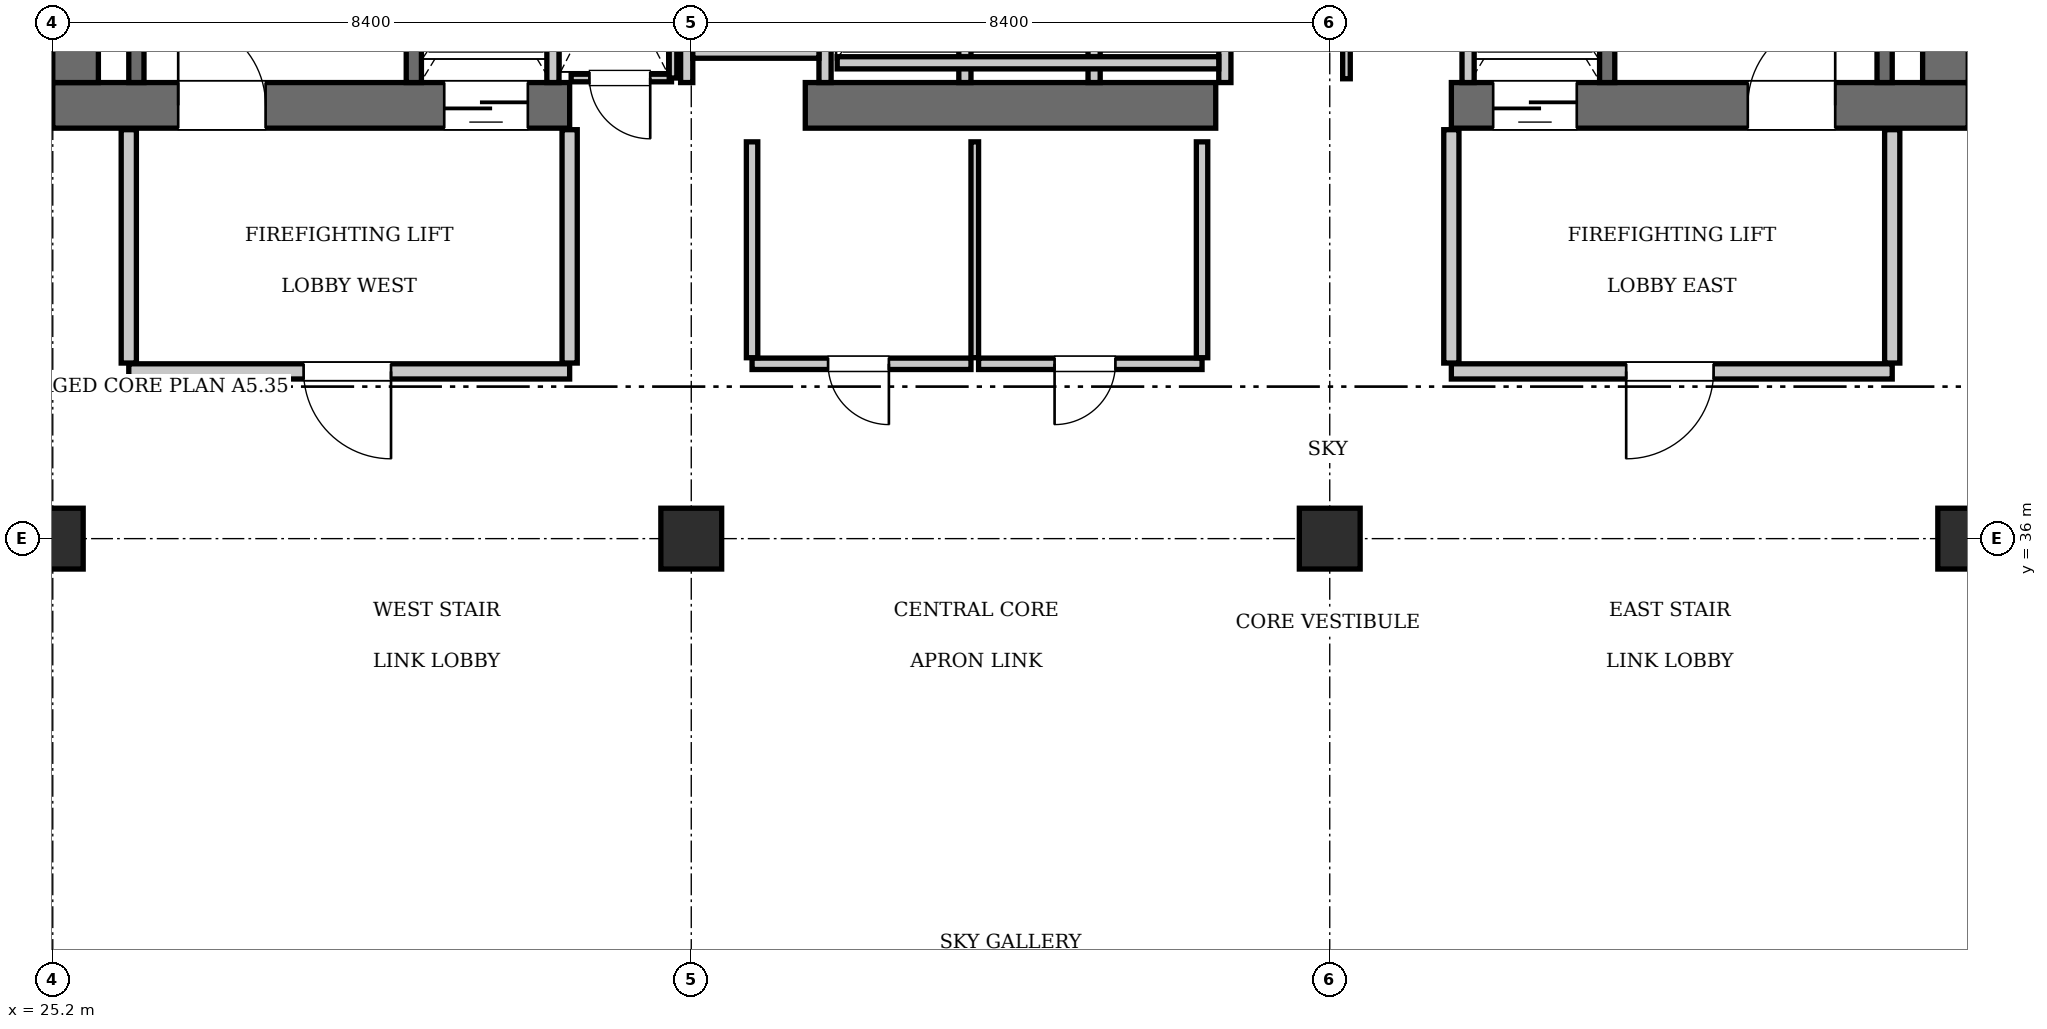
"""IFC4 building model, lengths in metres.
Left out: names, types, materials, properties, quantities, classifications, styles, units other than length and angle.
Written with IfcOpenShell. Run it as: python <this file> out.ifc"""

import sys

from ifc_helpers import new_model, si_unit, direction, frame, frame_2d, origin, origin_2d, place, context, subcontext, project, spatial, rectangle, extrude, element, fill, save


model = new_model("IFC4")
c1 = context("Model", 3, precision=1e-05, world=origin(), true_north=direction((0.0, 1.0)))
c2 = subcontext(c1, "Body", "Model", "MODEL_VIEW")
j1 = project(units=[si_unit("LENGTHUNIT", "METRE"), si_unit("PLANEANGLEUNIT", "RADIAN")], contexts=[c1])
p1 = place(None, origin())
s1 = spatial("IfcSite", under=j1, at=p1, CompositionType="ELEMENT")
p2 = place(p1, origin())
s2 = spatial("IfcBuilding", under=s1, at=p2, CompositionType="ELEMENT")
p3 = place(p2, frame((0.0, 0.0, 337.4)))
s3 = spatial("IfcBuildingStorey", under=s2, at=p3, CompositionType="ELEMENT", Elevation=337.4)
p4 = place(p3, frame((25.2, 41.7, 0.0), z_axis=(0.0, 0.0, 1.0), x_axis=(1.0, 0.0, 0.0)))
e1 = element("IfcWall", 1, at=p4, inside=s3, PredefinedType="SHEAR", context=c2, shape_type="SweptSolid", body=[
    extrude(rectangle(XDim=6.8, YDim=0.6, at=frame_2d((3.4, 0.0))), origin(), (0.0, 0.0, 1.0), 3.85),
])
p5 = place(p4, frame((1.65, 0.0, 0.0)))
e2 = element("IfcOpeningElement", 2, at=p5, cuts=e1, PredefinedType="OPENING", context=c2, shape_type="SweptSolid", body=[
    extrude(rectangle(XDim=1.15, YDim=2.15, at=frame_2d((0.575, 1.075))), frame((0.0, 0.31, 0.0), z_axis=(0.0, -1.0, 0.0), x_axis=(1.0, 0.0, 0.0)), (0.0, 0.0, 1.0), 0.62),
])
p6 = place(p4, frame((5.15, 0.0, 0.0)))
e3 = element("IfcOpeningElement", 3, at=p6, cuts=e1, PredefinedType="OPENING", context=c2, shape_type="SweptSolid", body=[
    extrude(rectangle(XDim=1.1, YDim=2.2, at=frame_2d((0.55, 1.1))), frame((0.0, 0.31, 0.0), z_axis=(0.0, -1.0, 0.0), x_axis=(1.0, 0.0, 0.0)), (0.0, 0.0, 1.0), 0.62),
])
p7 = place(p3, frame((35.1, 41.7, 0.0), z_axis=(0.0, 0.0, 1.0), x_axis=(1.0, 0.0, 0.0)))
e4 = element("IfcWall", 4, at=p7, inside=s3, PredefinedType="SHEAR", context=c2, shape_type="SweptSolid", body=[
    extrude(rectangle(XDim=5.4, YDim=0.6, at=frame_2d((2.7, 0.0))), origin(), (0.0, 0.0, 1.0), 3.85),
])
p8 = place(p3, frame((43.6, 41.7, 0.0), z_axis=(0.0, 0.0, 1.0), x_axis=(1.0, 0.0, 0.0)))
e5 = element("IfcWall", 5, at=p8, inside=s3, PredefinedType="SHEAR", context=c2, shape_type="SweptSolid", body=[
    extrude(rectangle(XDim=6.8, YDim=0.6, at=frame_2d((3.4, 0.0))), origin(), (0.0, 0.0, 1.0), 3.85),
])
p9 = place(p8, frame((3.9, 0.0, 0.0)))
e6 = element("IfcOpeningElement", 6, at=p9, cuts=e5, PredefinedType="OPENING", context=c2, shape_type="SweptSolid", body=[
    extrude(rectangle(XDim=1.15, YDim=2.15, at=frame_2d((0.575, 1.075))), frame((0.0, 0.31, 0.0), z_axis=(0.0, -1.0, 0.0), x_axis=(1.0, 0.0, 0.0)), (0.0, 0.0, 1.0), 0.62),
])
p10 = place(p8, frame((0.55, 0.0, 0.0)))
e7 = element("IfcOpeningElement", 7, at=p10, cuts=e5, PredefinedType="OPENING", context=c2, shape_type="SweptSolid", body=[
    extrude(rectangle(XDim=1.1, YDim=2.2, at=frame_2d((0.55, 1.1))), frame((0.0, 0.31, 0.0), z_axis=(0.0, -1.0, 0.0), x_axis=(1.0, 0.0, 0.0)), (0.0, 0.0, 1.0), 0.62),
])
for number, where, z_axis, x_axis in (
    (8, (25.5, 42.0, 0.0), (0.0, 0.0, 1.0), (0.0, 1.0, 0.0)),
    (9, (50.1, 42.0, 0.0), (0.0, 0.0, 1.0), (0.0, 1.0, 0.0)),
):
    element("IfcWall", number, at=place(p3, frame(where, z_axis=z_axis, x_axis=x_axis)), inside=s3, PredefinedType="SHEAR", context=c2, shape_type="SweptSolid", body=[
        extrude(rectangle(XDim=2.325, YDim=0.6, at=frame_2d((1.163, 0.0))), origin(), (0.0, 0.0, 1.0), 3.85),
    ])
for number, where, z_axis, x_axis in (
    (10, (25.2, 36.0, 0.0), (0.0, 0.0, 1.0), (1.0, 0.0, 0.0)),
    (11, (33.6, 36.0, 0.0), (0.0, 0.0, 1.0), (1.0, 0.0, 0.0)),
    (12, (42.0, 36.0, 0.0), (0.0, 0.0, 1.0), (1.0, 0.0, 0.0)),
    (13, (50.4, 36.0, 0.0), (0.0, 0.0, 1.0), (1.0, 0.0, 0.0)),
):
    element("IfcColumn", number, at=place(p3, frame(where, z_axis=z_axis, x_axis=x_axis)), inside=s3, PredefinedType="COLUMN", context=c2, shape_type="SweptSolid", body=[
        extrude(rectangle(XDim=0.8, YDim=0.8, at=origin_2d()), origin(), (0.0, 0.0, 1.0), 3.85),
    ])
p11 = place(p3, frame((29.95, 42.0, 0.0), z_axis=(0.0, 0.0, 1.0), x_axis=(0.0, 1.0, 0.0)))
e14 = element("IfcWall", 14, at=p11, inside=s3, PredefinedType="SOLIDWALL", context=c2, shape_type="SweptSolid", body=[
    extrude(rectangle(XDim=9.15, YDim=0.2, at=frame_2d((4.575, 0.0))), origin(), (0.0, 0.0, 1.0), 3.61),
])
p12 = place(p3, frame((26.3, 42.0, 0.0), z_axis=(0.0, 0.0, 1.0), x_axis=(0.0, 1.0, 0.0)))
e15 = element("IfcWall", 15, at=p12, inside=s3, PredefinedType="SOLIDWALL", context=c2, shape_type="SweptSolid", body=[
    extrude(rectangle(XDim=9.12, YDim=0.2, at=frame_2d((4.56, 0.0))), origin(), (0.0, 0.0, 1.0), 3.61),
])
p13 = place(p3, frame((45.65, 42.0, 0.0), z_axis=(0.0, 0.0, 1.0), x_axis=(0.0, 1.0, 0.0)))
e16 = element("IfcWall", 16, at=p13, inside=s3, PredefinedType="SOLIDWALL", context=c2, shape_type="SweptSolid", body=[
    extrude(rectangle(XDim=9.15, YDim=0.2, at=frame_2d((4.575, 0.0))), origin(), (0.0, 0.0, 1.0), 3.61),
])
p14 = place(p3, frame((49.3, 42.0, 0.0), z_axis=(0.0, 0.0, 1.0), x_axis=(0.0, 1.0, 0.0)))
e17 = element("IfcWall", 17, at=p14, inside=s3, PredefinedType="SOLIDWALL", context=c2, shape_type="SweptSolid", body=[
    extrude(rectangle(XDim=9.12, YDim=0.2, at=frame_2d((4.56, 0.0))), origin(), (0.0, 0.0, 1.0), 3.61),
])
for number, where, z_axis, x_axis in (
    (18, (31.78, 42.0, 0.0), (0.0, 0.0, 1.0), (0.0, 1.0, 0.0)),
    (19, (43.82, 42.0, 0.0), (0.0, 0.0, 1.0), (0.0, 1.0, 0.0)),
):
    element("IfcWall", number, at=place(p3, frame(where, z_axis=z_axis, x_axis=x_axis)), inside=s3, PredefinedType="SOLIDWALL", context=c2, shape_type="SweptSolid", body=[
        extrude(rectangle(XDim=2.74, YDim=0.16, at=frame_2d((1.37, 0.0))), origin(), (0.0, 0.0, 1.0), 3.61),
    ])
for number, where, z_axis, x_axis in (
    (20, (37.2, 42.0, 0.0), (0.0, 0.0, 1.0), (0.0, 1.0, 0.0)),
    (21, (38.9, 42.0, 0.0), (0.0, 0.0, 1.0), (0.0, 1.0, 0.0)),
    (22, (40.62, 42.0, 0.0), (0.0, 0.0, 1.0), (0.0, 1.0, 0.0)),
):
    element("IfcWall", number, at=place(p3, frame(where, z_axis=z_axis, x_axis=x_axis)), inside=s3, PredefinedType="SOLIDWALL", context=c2, shape_type="SweptSolid", body=[
        extrude(rectangle(XDim=2.35, YDim=0.16, at=frame_2d((1.175, 0.0))), origin(), (0.0, 0.0, 1.0), 3.61),
    ])
p15 = place(p3, frame((35.52, 42.26, 0.0), z_axis=(0.0, 0.0, 1.0), x_axis=(1.0, 0.0, 0.0)))
e23 = element("IfcWall", 23, at=p15, inside=s3, PredefinedType="SOLIDWALL", context=c2, shape_type="SweptSolid", body=[
    extrude(rectangle(XDim=5.02, YDim=0.16, at=frame_2d((2.51, 0.0))), origin(), (0.0, 0.0, 1.0), 3.61),
])
for number, where, z_axis, x_axis in (
    (24, (33.54, 42.0, 0.0), (0.0, 0.0, 1.0), (0.0, 1.0, 0.0)),
    (25, (35.36, 42.0, 0.0), (0.0, 0.0, 1.0), (0.0, 1.0, 0.0)),
):
    element("IfcWall", number, at=place(p3, frame(where, z_axis=z_axis, x_axis=x_axis)), inside=s3, PredefinedType="SOLIDWALL", context=c2, shape_type="SweptSolid", body=[
        extrude(rectangle(XDim=2.4, YDim=0.16, at=frame_2d((1.2, 0.0))), origin(), (0.0, 0.0, 1.0), 3.61),
    ])
p16 = place(p3, frame((33.62, 42.4, 0.0), z_axis=(0.0, 0.0, 1.0), x_axis=(1.0, 0.0, 0.0)))
e26 = element("IfcWall", 26, at=p16, inside=s3, PredefinedType="SOLIDWALL", context=c2, shape_type="SweptSolid", body=[
    extrude(rectangle(XDim=1.66, YDim=0.16, at=frame_2d((0.83, 0.0))), origin(), (0.0, 0.0, 1.0), 3.61),
])
p17 = place(p3, frame((26.2, 38.2, 0.0), z_axis=(0.0, 0.0, 1.0), x_axis=(1.0, 0.0, 0.0)))
e27 = element("IfcWall", 27, at=p17, inside=s3, PredefinedType="PARTITIONING", context=c2, shape_type="SweptSolid", body=[
    extrude(rectangle(XDim=5.8, YDim=0.2, at=frame_2d((2.9, 0.0))), origin(), (0.0, 0.0, 1.0), 3.61),
])
p18 = place(p17, frame((2.3, 0.0, 0.0)))
e28 = element("IfcOpeningElement", 28, at=p18, cuts=e27, PredefinedType="OPENING", context=c2, shape_type="SweptSolid", body=[
    extrude(rectangle(XDim=1.15, YDim=2.15, at=frame_2d((0.575, 1.075))), frame((0.0, 0.11, 0.0), z_axis=(0.0, -1.0, 0.0), x_axis=(1.0, 0.0, 0.0)), (0.0, 0.0, 1.0), 0.22),
])
for number, where, z_axis, x_axis in (
    (29, (26.2, 38.31, 0.0), (0.0, 0.0, 1.0), (0.0, 1.0, 0.0)),
    (30, (32.0, 38.31, 0.0), (0.0, 0.0, 1.0), (0.0, 1.0, 0.0)),
):
    element("IfcWall", number, at=place(p3, frame(where, z_axis=z_axis, x_axis=x_axis)), inside=s3, PredefinedType="PARTITIONING", context=c2, shape_type="SweptSolid", body=[
        extrude(rectangle(XDim=3.07, YDim=0.2, at=frame_2d((1.535, 0.0))), origin(), (0.0, 0.0, 1.0), 3.61),
    ])
p19 = place(p3, frame((43.6, 38.2, 0.0), z_axis=(0.0, 0.0, 1.0), x_axis=(1.0, 0.0, 0.0)))
e31 = element("IfcWall", 31, at=p19, inside=s3, PredefinedType="PARTITIONING", context=c2, shape_type="SweptSolid", body=[
    extrude(rectangle(XDim=5.8, YDim=0.2, at=frame_2d((2.9, 0.0))), origin(), (0.0, 0.0, 1.0), 3.61),
])
p20 = place(p19, frame((2.3, 0.0, 0.0)))
e32 = element("IfcOpeningElement", 32, at=p20, cuts=e31, PredefinedType="OPENING", context=c2, shape_type="SweptSolid", body=[
    extrude(rectangle(XDim=1.15, YDim=2.15, at=frame_2d((0.575, 1.075))), frame((0.0, 0.11, 0.0), z_axis=(0.0, -1.0, 0.0), x_axis=(1.0, 0.0, 0.0)), (0.0, 0.0, 1.0), 0.22),
])
for number, where, z_axis, x_axis in (
    (33, (43.6, 38.31, 0.0), (0.0, 0.0, 1.0), (0.0, 1.0, 0.0)),
    (34, (49.4, 38.31, 0.0), (0.0, 0.0, 1.0), (0.0, 1.0, 0.0)),
):
    element("IfcWall", number, at=place(p3, frame(where, z_axis=z_axis, x_axis=x_axis)), inside=s3, PredefinedType="PARTITIONING", context=c2, shape_type="SweptSolid", body=[
        extrude(rectangle(XDim=3.07, YDim=0.2, at=frame_2d((1.535, 0.0))), origin(), (0.0, 0.0, 1.0), 3.61),
    ])
p21 = place(p3, frame((32.02, 42.06, 0.0), z_axis=(0.0, 0.0, 1.0), x_axis=(1.0, 0.0, 0.0)))
e35 = element("IfcWall", 35, at=p21, inside=s3, PredefinedType="PARTITIONING", context=c2, shape_type="SweptSolid", body=[
    extrude(rectangle(XDim=1.32, YDim=0.1, at=frame_2d((0.66, 0.0))), origin(), (0.0, 0.0, 1.0), 3.61),
])
p22 = place(p21, frame((0.24, 0.0, 0.0)))
e36 = element("IfcOpeningElement", 36, at=p22, cuts=e35, PredefinedType="OPENING", context=c2, shape_type="SweptSolid", body=[
    extrude(rectangle(XDim=0.8, YDim=2.05, at=frame_2d((0.4, 1.025))), frame((0.0, 0.06, 0.0), z_axis=(0.0, -1.0, 0.0), x_axis=(1.0, 0.0, 0.0)), (0.0, 0.0, 1.0), 0.12),
])
p23 = place(p3, frame((33.36, 42.06, 0.0), z_axis=(0.0, 0.0, 1.0), x_axis=(0.0, 1.0, 0.0)))
e37 = element("IfcWall", 37, at=p23, inside=s3, PredefinedType="PARTITIONING", context=c2, shape_type="SweptSolid", body=[
    extrude(rectangle(XDim=2.88, YDim=0.1, at=frame_2d((1.44, 0.0))), origin(), (0.0, 0.0, 1.0), 3.61),
])
p24 = place(p3, frame((42.22, 42.05, 0.0), z_axis=(0.0, 0.0, 1.0), x_axis=(0.0, 1.0, 0.0)))
e38 = element("IfcWall", 38, at=p24, inside=s3, PredefinedType="PARTITIONING", context=c2, shape_type="SweptSolid", body=[
    extrude(rectangle(XDim=2.91, YDim=0.1, at=frame_2d((1.455, 0.0))), origin(), (0.0, 0.0, 1.0), 3.61),
])
p25 = place(p24, frame((0.65, 0.0, 0.0)))
e39 = element("IfcOpeningElement", 39, at=p25, cuts=e38, PredefinedType="OPENING", context=c2, shape_type="SweptSolid", body=[
    extrude(rectangle(XDim=0.8, YDim=2.05, at=frame_2d((0.4, 1.025))), frame((0.0, 0.06, 0.0), z_axis=(0.0, -1.0, 0.0), x_axis=(1.0, 0.0, 0.0)), (0.0, 0.0, 1.0), 0.12),
])
p26 = place(p3, frame((34.4, 38.3, 0.0), z_axis=(0.0, 0.0, 1.0), x_axis=(1.0, 0.0, 0.0)))
e40 = element("IfcWall", 40, at=p26, inside=s3, PredefinedType="PARTITIONING", context=c2, shape_type="SweptSolid", body=[
    extrude(rectangle(XDim=2.88, YDim=0.15, at=frame_2d((1.44, 0.0))), origin(), (0.0, 0.0, 1.0), 3.61),
])
p27 = place(p26, frame((1.0, 0.0, 0.0)))
e41 = element("IfcOpeningElement", 41, at=p27, cuts=e40, PredefinedType="OPENING", context=c2, shape_type="SweptSolid", body=[
    extrude(rectangle(XDim=0.8, YDim=2.05, at=frame_2d((0.4, 1.025))), frame((0.0, 0.085, 0.0), z_axis=(0.0, -1.0, 0.0), x_axis=(1.0, 0.0, 0.0)), (0.0, 0.0, 1.0), 0.17),
])
p28 = place(p3, frame((37.38, 38.3, 0.0), z_axis=(0.0, 0.0, 1.0), x_axis=(1.0, 0.0, 0.0)))
e42 = element("IfcWall", 42, at=p28, inside=s3, PredefinedType="PARTITIONING", context=c2, shape_type="SweptSolid", body=[
    extrude(rectangle(XDim=2.94, YDim=0.15, at=frame_2d((1.47, 0.0))), origin(), (0.0, 0.0, 1.0), 3.61),
])
p29 = place(p28, frame((1.0, 0.0, 0.0)))
e43 = element("IfcOpeningElement", 43, at=p29, cuts=e42, PredefinedType="OPENING", context=c2, shape_type="SweptSolid", body=[
    extrude(rectangle(XDim=0.8, YDim=2.05, at=frame_2d((0.4, 1.025))), frame((0.0, 0.085, 0.0), z_axis=(0.0, -1.0, 0.0), x_axis=(1.0, 0.0, 0.0)), (0.0, 0.0, 1.0), 0.17),
])
p30 = place(p3, frame((34.4, 38.38, 0.0), z_axis=(0.0, 0.0, 1.0), x_axis=(0.0, 1.0, 0.0)))
e44 = element("IfcWall", 44, at=p30, inside=s3, PredefinedType="PARTITIONING", context=c2, shape_type="SweptSolid", body=[
    extrude(rectangle(XDim=2.84, YDim=0.15, at=frame_2d((1.42, 0.0))), origin(), (0.0, 0.0, 1.0), 3.61),
])
p31 = place(p3, frame((37.33, 38.38, 0.0), z_axis=(0.0, 0.0, 1.0), x_axis=(0.0, 1.0, 0.0)))
e45 = element("IfcWall", 45, at=p31, inside=s3, PredefinedType="PARTITIONING", context=c2, shape_type="SweptSolid", body=[
    extrude(rectangle(XDim=2.84, YDim=0.1, at=frame_2d((1.42, 0.0))), origin(), (0.0, 0.0, 1.0), 3.61),
])
p32 = place(p3, frame((40.32, 38.38, 0.0), z_axis=(0.0, 0.0, 1.0), x_axis=(0.0, 1.0, 0.0)))
e46 = element("IfcWall", 46, at=p32, inside=s3, PredefinedType="PARTITIONING", context=c2, shape_type="SweptSolid", body=[
    extrude(rectangle(XDim=2.84, YDim=0.15, at=frame_2d((1.42, 0.0))), origin(), (0.0, 0.0, 1.0), 3.61),
])
p33 = place(p5, origin())
e47 = element("IfcDoor", 47, at=p33, inside=s3, OperationType="SINGLE_SWING_LEFT", PredefinedType="DOOR", context=c2, shape_type="SweptSolid", body=[
    extrude(rectangle(XDim=1.15, YDim=2.15, at=frame_2d((0.575, 1.075))), frame((0.0, 0.025, 0.0), z_axis=(0.0, -1.0, 0.0), x_axis=(1.0, 0.0, 0.0)), (0.0, 0.0, 1.0), 0.05),
])
fill(e2, e47)
p34 = place(p9, origin())
e48 = element("IfcDoor", 48, at=p34, inside=s3, OperationType="SINGLE_SWING_RIGHT", PredefinedType="DOOR", context=c2, shape_type="SweptSolid", body=[
    extrude(rectangle(XDim=1.15, YDim=2.15, at=frame_2d((0.575, 1.075))), frame((0.0, 0.025, 0.0), z_axis=(0.0, -1.0, 0.0), x_axis=(1.0, 0.0, 0.0)), (0.0, 0.0, 1.0), 0.05),
])
fill(e6, e48)
p35 = place(p6, frame((1.1, 0.0, 0.0), z_axis=(0.0, 0.0, 1.0), x_axis=(-1.0, 0.0, 0.0)))
e49 = element("IfcDoor", 49, at=p35, inside=s3, OperationType="SLIDING_TO_LEFT", PredefinedType="DOOR", context=c2, shape_type="SweptSolid", body=[
    extrude(rectangle(XDim=1.1, YDim=2.2, at=frame_2d((0.55, 1.1))), frame((0.0, 0.025, 0.0), z_axis=(0.0, -1.0, 0.0), x_axis=(1.0, 0.0, 0.0)), (0.0, 0.0, 1.0), 0.05),
])
fill(e3, e49)
p36 = place(p10, frame((1.1, 0.0, 0.0), z_axis=(0.0, 0.0, 1.0), x_axis=(-1.0, 0.0, 0.0)))
e50 = element("IfcDoor", 50, at=p36, inside=s3, OperationType="SLIDING_TO_LEFT", PredefinedType="DOOR", context=c2, shape_type="SweptSolid", body=[
    extrude(rectangle(XDim=1.1, YDim=2.2, at=frame_2d((0.55, 1.1))), frame((0.0, 0.025, 0.0), z_axis=(0.0, -1.0, 0.0), x_axis=(1.0, 0.0, 0.0)), (0.0, 0.0, 1.0), 0.05),
])
fill(e7, e50)
p37 = place(p18, frame((1.15, 0.0, 0.0), z_axis=(0.0, 0.0, 1.0), x_axis=(-1.0, 0.0, 0.0)))
e51 = element("IfcDoor", 51, at=p37, inside=s3, OperationType="SINGLE_SWING_LEFT", PredefinedType="DOOR", context=c2, shape_type="SweptSolid", body=[
    extrude(rectangle(XDim=1.15, YDim=2.15, at=frame_2d((0.575, 1.075))), frame((0.0, 0.025, 0.0), z_axis=(0.0, -1.0, 0.0), x_axis=(1.0, 0.0, 0.0)), (0.0, 0.0, 1.0), 0.05),
])
fill(e28, e51)
p38 = place(p20, frame((1.15, 0.0, 0.0), z_axis=(0.0, 0.0, 1.0), x_axis=(-1.0, 0.0, 0.0)))
e52 = element("IfcDoor", 52, at=p38, inside=s3, OperationType="SINGLE_SWING_RIGHT", PredefinedType="DOOR", context=c2, shape_type="SweptSolid", body=[
    extrude(rectangle(XDim=1.15, YDim=2.15, at=frame_2d((0.575, 1.075))), frame((0.0, 0.025, 0.0), z_axis=(0.0, -1.0, 0.0), x_axis=(1.0, 0.0, 0.0)), (0.0, 0.0, 1.0), 0.05),
])
fill(e32, e52)
p39 = place(p22, frame((0.8, 0.0, 0.0), z_axis=(0.0, 0.0, 1.0), x_axis=(-1.0, 0.0, 0.0)))
e53 = element("IfcDoor", 53, at=p39, inside=s3, OperationType="SINGLE_SWING_LEFT", PredefinedType="DOOR", context=c2, shape_type="SweptSolid", body=[
    extrude(rectangle(XDim=0.8, YDim=2.05, at=frame_2d((0.4, 1.025))), frame((0.0, 0.025, 0.0), z_axis=(0.0, -1.0, 0.0), x_axis=(1.0, 0.0, 0.0)), (0.0, 0.0, 1.0), 0.05),
])
fill(e36, e53)
p40 = place(p27, frame((0.8, 0.0, 0.0), z_axis=(0.0, 0.0, 1.0), x_axis=(-1.0, 0.0, 0.0)))
e54 = element("IfcDoor", 54, at=p40, inside=s3, OperationType="SINGLE_SWING_LEFT", PredefinedType="DOOR", context=c2, shape_type="SweptSolid", body=[
    extrude(rectangle(XDim=0.8, YDim=2.05, at=frame_2d((0.4, 1.025))), frame((0.0, 0.025, 0.0), z_axis=(0.0, -1.0, 0.0), x_axis=(1.0, 0.0, 0.0)), (0.0, 0.0, 1.0), 0.05),
])
fill(e41, e54)
p41 = place(p29, frame((0.8, 0.0, 0.0), z_axis=(0.0, 0.0, 1.0), x_axis=(-1.0, 0.0, 0.0)))
e55 = element("IfcDoor", 55, at=p41, inside=s3, OperationType="SINGLE_SWING_RIGHT", PredefinedType="DOOR", context=c2, shape_type="SweptSolid", body=[
    extrude(rectangle(XDim=0.8, YDim=2.05, at=frame_2d((0.4, 1.025))), frame((0.0, 0.025, 0.0), z_axis=(0.0, -1.0, 0.0), x_axis=(1.0, 0.0, 0.0)), (0.0, 0.0, 1.0), 0.05),
])
fill(e43, e55)
save(model, sys.argv[1])
